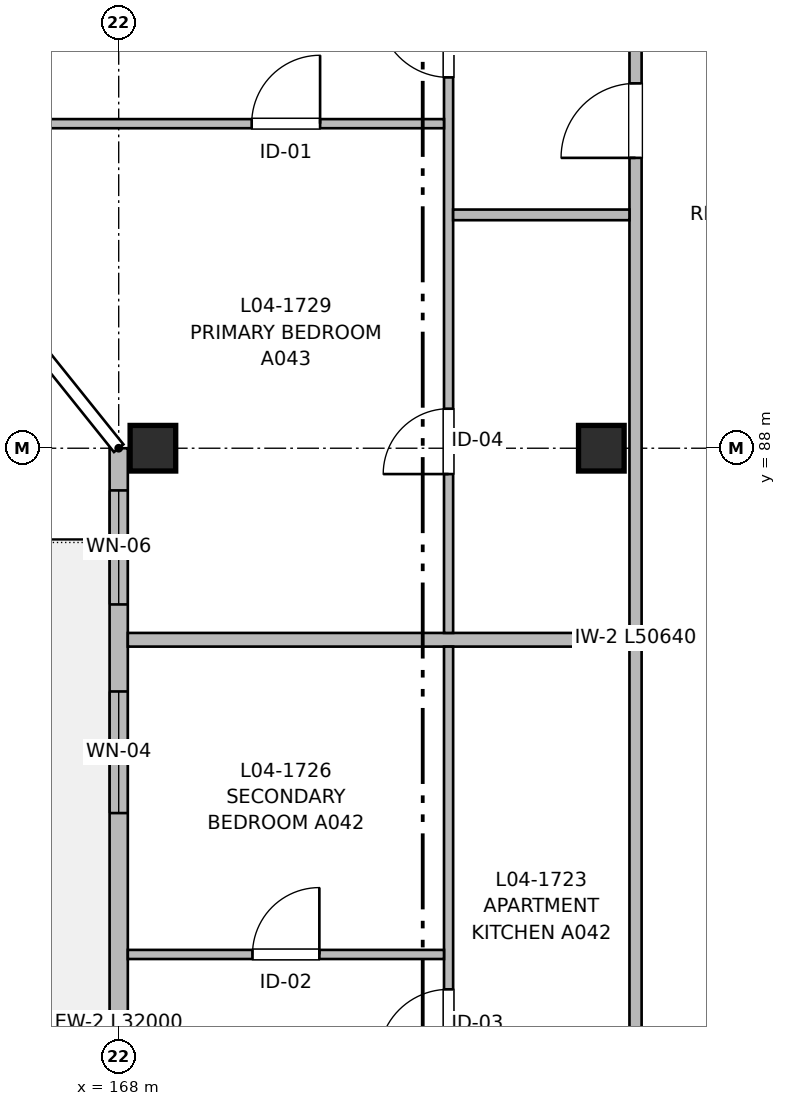
"""IFC4 building model, lengths in metres.
Left out: names, types, materials, properties, quantities, classifications, styles, units other than length and angle.
Written with IfcOpenShell. Run it as: python <this file> out.ifc"""

import sys

from ifc_helpers import new_model, si_unit, direction, frame, frame_2d, origin, origin_2d, place, context, subcontext, project, spatial, rectangle, extrude, element, fill, save


model = new_model("IFC4")
c1 = context("Model", 3, precision=1e-05, world=origin(), true_north=direction((0.0, 1.0)))
c2 = subcontext(c1, "Body", "Model", "MODEL_VIEW")
j1 = project(units=[si_unit("LENGTHUNIT", "METRE"), si_unit("PLANEANGLEUNIT", "RADIAN")], contexts=[c1])
p1 = place(None, origin())
s1 = spatial("IfcSite", under=j1, at=p1, CompositionType="ELEMENT")
p2 = place(p1, origin())
s2 = spatial("IfcBuilding", under=s1, at=p2, CompositionType="ELEMENT")
p3 = place(p2, frame((0.0, 0.0, 13.76)))
s3 = spatial("IfcBuildingStorey", under=s2, at=p3, CompositionType="ELEMENT", Elevation=13.76)
for number, where, z_axis, x_axis in (
    (1, (168.45, 88.0, 0.0), (0.0, 0.0, 1.0), (1.0, 0.0, 0.0)),
    (2, (174.35, 88.0, 0.0), (0.0, 0.0, 1.0), (1.0, 0.0, 0.0)),
):
    element("IfcColumn", number, at=place(p3, frame(where, z_axis=z_axis, x_axis=x_axis)), inside=s3, PredefinedType="COLUMN", context=c2, shape_type="SweptSolid", body=[
        extrude(rectangle(XDim=0.6, YDim=0.6, at=origin_2d()), origin(), (0.0, 0.0, 1.0), 3.2),
    ])
p4 = place(p3, frame((168.0, 56.0, 0.0), z_axis=(0.0, 0.0, 1.0), x_axis=(0.0, 1.0, 0.0)))
e3 = element("IfcWall", 3, at=p4, inside=s3, PredefinedType="SOLIDWALL", context=c2, shape_type="SweptSolid", body=[
    extrude(rectangle(XDim=32.0, YDim=0.24, at=frame_2d((16.0, 0.0))), origin(), (0.0, 0.0, 1.0), 2.98),
])
p5 = place(p4, frame((2.95, 0.0, 0.0)))
e4 = element("IfcOpeningElement", 4, at=p5, cuts=e3, PredefinedType="OPENING", context=c2, shape_type="SweptSolid", body=[
    extrude(rectangle(XDim=1.2, YDim=2.2, at=frame_2d((0.6, 1.1))), frame((0.0, 0.13, 0.0), z_axis=(0.0, -1.0, 0.0), x_axis=(1.0, 0.0, 0.0)), (0.0, 0.0, 1.0), 0.26),
])
p6 = place(p4, frame((5.3, 0.0, 0.67)))
e5 = element("IfcOpeningElement", 5, at=p6, cuts=e3, PredefinedType="OPENING", context=c2, shape_type="SweptSolid", body=[
    extrude(rectangle(XDim=2.1, YDim=1.55, at=frame_2d((1.05, 0.775))), frame((0.0, 0.13, 0.0), z_axis=(0.0, -1.0, 0.0), x_axis=(1.0, 0.0, 0.0)), (0.0, 0.0, 1.0), 0.26),
])
p7 = place(p4, frame((11.45, 0.0, 0.72)))
e6 = element("IfcOpeningElement", 6, at=p7, cuts=e3, PredefinedType="OPENING", context=c2, shape_type="SweptSolid", body=[
    extrude(rectangle(XDim=2.0, YDim=1.5, at=frame_2d((1.0, 0.75))), frame((0.0, 0.13, 0.0), z_axis=(0.0, -1.0, 0.0), x_axis=(1.0, 0.0, 0.0)), (0.0, 0.0, 1.0), 0.26),
])
p8 = place(p4, frame((20.025, 0.0, 0.77)))
e7 = element("IfcOpeningElement", 7, at=p8, cuts=e3, PredefinedType="OPENING", context=c2, shape_type="SweptSolid", body=[
    extrude(rectangle(XDim=1.65, YDim=1.45, at=frame_2d((0.825, 0.725))), frame((0.0, 0.13, 0.0), z_axis=(0.0, -1.0, 0.0), x_axis=(1.0, 0.0, 0.0)), (0.0, 0.0, 1.0), 0.26),
])
p9 = place(p4, frame((27.2, 0.0, 0.77)))
e8 = element("IfcOpeningElement", 8, at=p9, cuts=e3, PredefinedType="OPENING", context=c2, shape_type="SweptSolid", body=[
    extrude(rectangle(XDim=1.6, YDim=1.45, at=frame_2d((0.8, 0.725))), frame((0.0, 0.13, 0.0), z_axis=(0.0, -1.0, 0.0), x_axis=(1.0, 0.0, 0.0)), (0.0, 0.0, 1.0), 0.26),
])
p10 = place(p4, frame((16.81, 0.0, 0.82)))
e9 = element("IfcOpeningElement", 9, at=p10, cuts=e3, PredefinedType="OPENING", context=c2, shape_type="SweptSolid", body=[
    extrude(rectangle(XDim=1.5, YDim=1.4, at=frame_2d((0.75, 0.7))), frame((0.0, 0.13, 0.0), z_axis=(0.0, -1.0, 0.0), x_axis=(1.0, 0.0, 0.0)), (0.0, 0.0, 1.0), 0.26),
])
p11 = place(p4, frame((29.945, 0.0, 0.82)))
e10 = element("IfcOpeningElement", 10, at=p11, cuts=e3, PredefinedType="OPENING", context=c2, shape_type="SweptSolid", body=[
    extrude(rectangle(XDim=1.5, YDim=1.4, at=frame_2d((0.75, 0.7))), frame((0.0, 0.13, 0.0), z_axis=(0.0, -1.0, 0.0), x_axis=(1.0, 0.0, 0.0)), (0.0, 0.0, 1.0), 0.26),
])
p12 = place(p3, frame((174.8, 56.16, 0.0), z_axis=(0.0, 0.0, 1.0), x_axis=(0.0, 1.0, 0.0)))
e11 = element("IfcWall", 11, at=p12, inside=s3, PredefinedType="PARTITIONING", context=c2, shape_type="SweptSolid", body=[
    extrude(rectangle(XDim=50.64, YDim=0.16, at=frame_2d((25.32, 0.0))), origin(), (0.0, 0.0, 1.0), 2.935),
])
p13 = place(p12, frame((8.49, 0.0, 0.0)))
e12 = element("IfcOpeningElement", 12, at=p13, cuts=e11, PredefinedType="OPENING", context=c2, shape_type="SweptSolid", body=[
    extrude(rectangle(XDim=0.98, YDim=2.15, at=frame_2d((0.49, 1.075))), frame((0.0, 0.09, 0.0), z_axis=(0.0, -1.0, 0.0), x_axis=(1.0, 0.0, 0.0)), (0.0, 0.0, 1.0), 0.18),
])
p14 = place(p12, frame((22.04, 0.0, 0.0)))
e13 = element("IfcOpeningElement", 13, at=p14, cuts=e11, PredefinedType="OPENING", context=c2, shape_type="SweptSolid", body=[
    extrude(rectangle(XDim=0.98, YDim=2.15, at=frame_2d((0.49, 1.075))), frame((0.0, 0.09, 0.0), z_axis=(0.0, -1.0, 0.0), x_axis=(1.0, 0.0, 0.0)), (0.0, 0.0, 1.0), 0.18),
])
p15 = place(p12, frame((35.66, 0.0, 0.0)))
e14 = element("IfcOpeningElement", 14, at=p15, cuts=e11, PredefinedType="OPENING", context=c2, shape_type="SweptSolid", body=[
    extrude(rectangle(XDim=0.98, YDim=2.15, at=frame_2d((0.49, 1.075))), frame((0.0, 0.09, 0.0), z_axis=(0.0, -1.0, 0.0), x_axis=(1.0, 0.0, 0.0)), (0.0, 0.0, 1.0), 0.18),
])
p16 = place(p12, frame((46.44, 0.0, 0.0)))
e15 = element("IfcOpeningElement", 15, at=p16, cuts=e11, PredefinedType="OPENING", context=c2, shape_type="SweptSolid", body=[
    extrude(rectangle(XDim=0.98, YDim=2.15, at=frame_2d((0.49, 1.075))), frame((0.0, 0.09, 0.0), z_axis=(0.0, -1.0, 0.0), x_axis=(1.0, 0.0, 0.0)), (0.0, 0.0, 1.0), 0.18),
])
p17 = place(p3, frame((168.12, 85.48, 0.0), z_axis=(0.0, 0.0, 1.0), x_axis=(1.0, 0.0, 0.0)))
e16 = element("IfcWall", 16, at=p17, inside=s3, PredefinedType="PARTITIONING", context=c2, shape_type="SweptSolid", body=[
    extrude(rectangle(XDim=6.6, YDim=0.18, at=frame_2d((3.3, 0.0))), origin(), (0.0, 0.0, 1.0), 2.935),
])
p18 = place(p3, frame((172.34, 71.42, 0.0), z_axis=(0.0, 0.0, 1.0), x_axis=(0.0, 1.0, 0.0)))
e17 = element("IfcWall", 17, at=p18, inside=s3, PredefinedType="PARTITIONING", context=c2, shape_type="SweptSolid", body=[
    extrude(rectangle(XDim=13.97, YDim=0.12, at=frame_2d((6.985, 0.0))), origin(), (0.0, 0.0, 1.0), 2.935),
])
p19 = place(p18, frame((2.443, 0.0, 0.0)))
e18 = element("IfcOpeningElement", 18, at=p19, cuts=e17, PredefinedType="OPENING", context=c2, shape_type="SweptSolid", body=[
    extrude(rectangle(XDim=0.86, YDim=2.1, at=frame_2d((0.43, 1.05))), frame((0.0, 0.07, 0.0), z_axis=(0.0, -1.0, 0.0), x_axis=(1.0, 0.0, 0.0)), (0.0, 0.0, 1.0), 0.14),
])
p20 = place(p18, frame((8.541, 0.0, 0.0)))
e19 = element("IfcOpeningElement", 19, at=p20, cuts=e17, PredefinedType="OPENING", context=c2, shape_type="SweptSolid", body=[
    extrude(rectangle(XDim=0.92, YDim=2.1, at=frame_2d((0.46, 1.05))), frame((0.0, 0.07, 0.0), z_axis=(0.0, -1.0, 0.0), x_axis=(1.0, 0.0, 0.0)), (0.0, 0.0, 1.0), 0.14),
])
p21 = place(p3, frame((168.12, 81.34, 0.0), z_axis=(0.0, 0.0, 1.0), x_axis=(1.0, 0.0, 0.0)))
e20 = element("IfcWall", 20, at=p21, inside=s3, PredefinedType="PARTITIONING", context=c2, shape_type="SweptSolid", body=[
    extrude(rectangle(XDim=4.16, YDim=0.12, at=frame_2d((2.08, 0.0))), origin(), (0.0, 0.0, 1.0), 2.935),
])
p22 = place(p21, frame((1.64, 0.0, 0.0)))
e21 = element("IfcOpeningElement", 21, at=p22, cuts=e20, PredefinedType="OPENING", context=c2, shape_type="SweptSolid", body=[
    extrude(rectangle(XDim=0.88, YDim=2.1, at=frame_2d((0.44, 1.05))), frame((0.0, 0.07, 0.0), z_axis=(0.0, -1.0, 0.0), x_axis=(1.0, 0.0, 0.0)), (0.0, 0.0, 1.0), 0.14),
])
p23 = place(p3, frame((172.34, 85.57, 0.0), z_axis=(0.0, 0.0, 1.0), x_axis=(0.0, 1.0, 0.0)))
e22 = element("IfcWall", 22, at=p23, inside=s3, PredefinedType="PARTITIONING", context=c2, shape_type="SweptSolid", body=[
    extrude(rectangle(XDim=11.96, YDim=0.12, at=frame_2d((5.98, 0.0))), origin(), (0.0, 0.0, 1.0), 2.935),
])
p24 = place(p23, frame((2.09, 0.0, 0.0)))
e23 = element("IfcOpeningElement", 23, at=p24, cuts=e22, PredefinedType="OPENING", context=c2, shape_type="SweptSolid", body=[
    extrude(rectangle(XDim=0.86, YDim=2.1, at=frame_2d((0.43, 1.05))), frame((0.0, 0.07, 0.0), z_axis=(0.0, -1.0, 0.0), x_axis=(1.0, 0.0, 0.0)), (0.0, 0.0, 1.0), 0.14),
])
p25 = place(p23, frame((7.309, 0.0, 0.0)))
e24 = element("IfcOpeningElement", 24, at=p25, cuts=e22, PredefinedType="OPENING", context=c2, shape_type="SweptSolid", body=[
    extrude(rectangle(XDim=0.92, YDim=2.1, at=frame_2d((0.46, 1.05))), frame((0.0, 0.07, 0.0), z_axis=(0.0, -1.0, 0.0), x_axis=(1.0, 0.0, 0.0)), (0.0, 0.0, 1.0), 0.14),
])
p26 = place(p3, frame((172.4, 91.07, 0.0), z_axis=(0.0, 0.0, 1.0), x_axis=(1.0, 0.0, 0.0)))
e25 = element("IfcWall", 25, at=p26, inside=s3, PredefinedType="PARTITIONING", context=c2, shape_type="SweptSolid", body=[
    extrude(rectangle(XDim=2.32, YDim=0.14, at=frame_2d((1.16, 0.0))), origin(), (0.0, 0.0, 1.0), 2.935),
])
p27 = place(p3, frame((164.625, 92.27, 0.0), z_axis=(0.0, 0.0, 1.0), x_axis=(1.0, 0.0, 0.0)))
e26 = element("IfcWall", 26, at=p27, inside=s3, PredefinedType="PARTITIONING", context=c2, shape_type="SweptSolid", body=[
    extrude(rectangle(XDim=7.655, YDim=0.12, at=frame_2d((3.827, 0.0))), origin(), (0.0, 0.0, 1.0), 2.935),
])
p28 = place(p27, frame((5.124, 0.0, 0.0)))
e27 = element("IfcOpeningElement", 27, at=p28, cuts=e26, PredefinedType="OPENING", context=c2, shape_type="SweptSolid", body=[
    extrude(rectangle(XDim=0.9, YDim=2.1, at=frame_2d((0.45, 1.05))), frame((0.0, 0.07, 0.0), z_axis=(0.0, -1.0, 0.0), x_axis=(1.0, 0.0, 0.0)), (0.0, 0.0, 1.0), 0.14),
])
p29 = place(p9, origin())
e28 = element("IfcWindow", 28, at=p29, inside=s3, PartitioningType="SINGLE_PANEL", PredefinedType="WINDOW", context=c2, shape_type="SweptSolid", body=[
    extrude(rectangle(XDim=1.6, YDim=1.45, at=frame_2d((0.8, 0.725))), frame((0.0, 0.03, 0.0), z_axis=(0.0, -1.0, 0.0), x_axis=(1.0, 0.0, 0.0)), (0.0, 0.0, 1.0), 0.06),
])
fill(e8, e28)
p30 = place(p20, origin())
e29 = element("IfcDoor", 29, at=p30, inside=s3, OperationType="SINGLE_SWING_LEFT", PredefinedType="DOOR", context=c2, shape_type="SweptSolid", body=[
    extrude(rectangle(XDim=0.92, YDim=2.1, at=frame_2d((0.46, 1.05))), frame((0.0, 0.025, 0.0), z_axis=(0.0, -1.0, 0.0), x_axis=(1.0, 0.0, 0.0)), (0.0, 0.0, 1.0), 0.05),
])
fill(e19, e29)
p31 = place(p22, origin())
e30 = element("IfcDoor", 30, at=p31, inside=s3, OperationType="SINGLE_SWING_RIGHT", PredefinedType="DOOR", context=c2, shape_type="SweptSolid", body=[
    extrude(rectangle(XDim=0.88, YDim=2.1, at=frame_2d((0.44, 1.05))), frame((0.0, 0.025, 0.0), z_axis=(0.0, -1.0, 0.0), x_axis=(1.0, 0.0, 0.0)), (0.0, 0.0, 1.0), 0.05),
])
fill(e21, e30)
p32 = place(p24, origin())
e31 = element("IfcDoor", 31, at=p32, inside=s3, OperationType="SINGLE_SWING_LEFT", PredefinedType="DOOR", context=c2, shape_type="SweptSolid", body=[
    extrude(rectangle(XDim=0.86, YDim=2.1, at=frame_2d((0.43, 1.05))), frame((0.0, 0.025, 0.0), z_axis=(0.0, -1.0, 0.0), x_axis=(1.0, 0.0, 0.0)), (0.0, 0.0, 1.0), 0.05),
])
fill(e23, e31)
p33 = place(p25, origin())
e32 = element("IfcDoor", 32, at=p33, inside=s3, OperationType="SINGLE_SWING_RIGHT", PredefinedType="DOOR", context=c2, shape_type="SweptSolid", body=[
    extrude(rectangle(XDim=0.92, YDim=2.1, at=frame_2d((0.46, 1.05))), frame((0.0, 0.025, 0.0), z_axis=(0.0, -1.0, 0.0), x_axis=(1.0, 0.0, 0.0)), (0.0, 0.0, 1.0), 0.05),
])
fill(e24, e32)
p34 = place(p15, origin())
e33 = element("IfcDoor", 33, at=p34, inside=s3, OperationType="SINGLE_SWING_LEFT", PredefinedType="DOOR", context=c2, shape_type="SweptSolid", body=[
    extrude(rectangle(XDim=0.98, YDim=2.15, at=frame_2d((0.49, 1.075))), frame((0.0, 0.025, 0.0), z_axis=(0.0, -1.0, 0.0), x_axis=(1.0, 0.0, 0.0)), (0.0, 0.0, 1.0), 0.05),
])
fill(e14, e33)
p35 = place(p28, origin())
e34 = element("IfcDoor", 34, at=p35, inside=s3, OperationType="SINGLE_SWING_RIGHT", PredefinedType="DOOR", context=c2, shape_type="SweptSolid", body=[
    extrude(rectangle(XDim=0.9, YDim=2.1, at=frame_2d((0.45, 1.05))), frame((0.0, 0.025, 0.0), z_axis=(0.0, -1.0, 0.0), x_axis=(1.0, 0.0, 0.0)), (0.0, 0.0, 1.0), 0.05),
])
fill(e27, e34)
p36 = place(p11, origin())
e35 = element("IfcWindow", 35, at=p36, inside=s3, PartitioningType="SINGLE_PANEL", PredefinedType="WINDOW", context=c2, shape_type="SweptSolid", body=[
    extrude(rectangle(XDim=1.5, YDim=1.4, at=frame_2d((0.75, 0.7))), frame((0.0, 0.03, 0.0), z_axis=(0.0, -1.0, 0.0), x_axis=(1.0, 0.0, 0.0)), (0.0, 0.0, 1.0), 0.06),
])
fill(e10, e35)
save(model, sys.argv[1])
